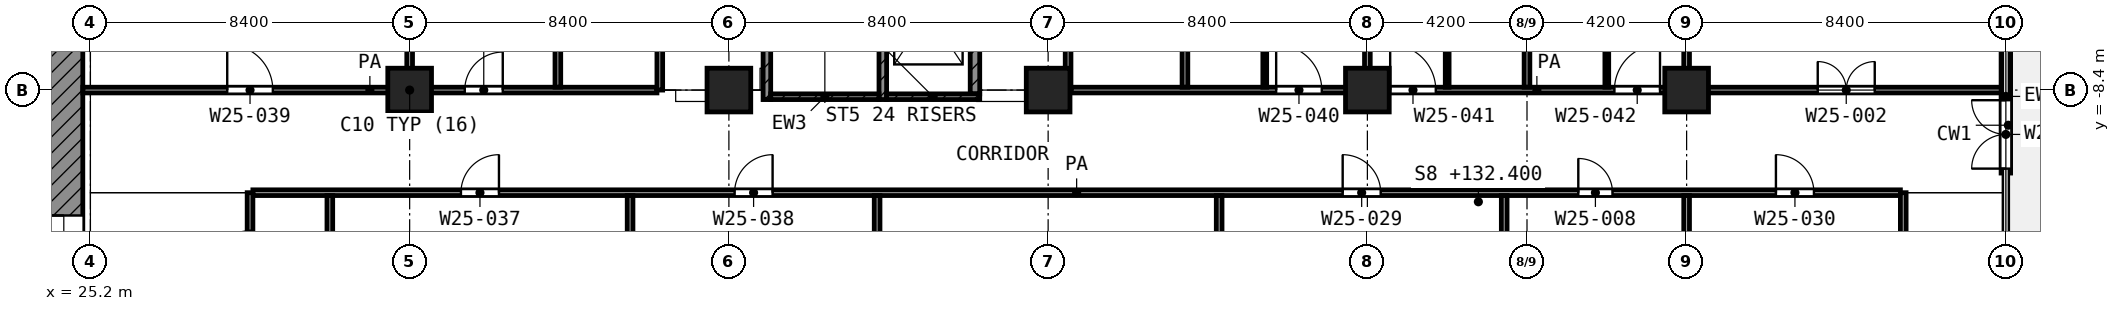
"""IFC4 building model, lengths in metres.
Left out: names, types, materials, properties, quantities, classifications, styles, units other than length and angle.
Written with IfcOpenShell. Run it as: python <this file> out.ifc"""

import sys

from ifc_helpers import new_model, si_unit, direction, frame, frame_2d, origin, origin_2d, place, context, subcontext, project, spatial, rectangle, extrude, element, fill, save


model = new_model("IFC4")
c1 = context("Model", 3, precision=1e-05, world=origin(), true_north=direction((0.0, 1.0)))
c2 = subcontext(c1, "Body", "Model", "MODEL_VIEW")
j1 = project(units=[si_unit("LENGTHUNIT", "METRE"), si_unit("PLANEANGLEUNIT", "RADIAN")], contexts=[c1])
p1 = place(None, origin())
s1 = spatial("IfcSite", under=j1, at=p1, CompositionType="ELEMENT")
p2 = place(p1, origin())
s2 = spatial("IfcBuilding", under=s1, at=p2, CompositionType="ELEMENT")
p3 = place(p2, frame((0.0, 0.0, 132.4)))
s3 = spatial("IfcBuildingStorey", under=s2, at=p3, CompositionType="ELEMENT", Elevation=132.4)
for number, where, z_axis, x_axis in (
    (1, (33.6, -8.4, 0.0), (0.0, 0.0, 1.0), (1.0, 0.0, 0.0)),
    (2, (42.0, -8.4, 0.0), (0.0, 0.0, 1.0), (1.0, 0.0, 0.0)),
    (3, (50.4, -8.4, 0.0), (0.0, 0.0, 1.0), (1.0, 0.0, 0.0)),
    (4, (58.8, -8.4, 0.0), (0.0, 0.0, 1.0), (1.0, 0.0, 0.0)),
    (5, (67.2, -8.4, 0.0), (0.0, 0.0, 1.0), (1.0, 0.0, 0.0)),
):
    element("IfcColumn", number, at=place(p3, frame(where, z_axis=z_axis, x_axis=x_axis)), inside=s3, PredefinedType="COLUMN", context=c2, shape_type="SweptSolid", body=[
        extrude(rectangle(XDim=1.15, YDim=1.15, at=origin_2d()), origin(), (0.0, 0.0, 1.0), 4.2),
    ])
p4 = place(p3, frame((75.6, -10.583, 0.0), z_axis=(0.0, 0.0, 1.0), x_axis=(0.0, 1.0, 0.0)))
e6 = element("IfcWall", 6, at=p4, inside=s3, PredefinedType="SOLIDWALL", context=c2, shape_type="SweptSolid", body=[
    extrude(rectangle(XDim=4.033, YDim=0.25, at=frame_2d((2.017, 0.0))), origin(), (0.0, 0.0, 1.0), 3.48),
])
p5 = place(p4, frame((0.117, 0.0, 0.0)))
e7 = element("IfcOpeningElement", 7, at=p5, cuts=e6, PredefinedType="OPENING", context=c2, shape_type="SweptSolid", body=[
    extrude(rectangle(XDim=1.8, YDim=2.1, at=frame_2d((0.9, 1.05))), frame((0.0, 0.135, 0.0), z_axis=(0.0, -1.0, 0.0), x_axis=(1.0, 0.0, 0.0)), (0.0, 0.0, 1.0), 0.27),
])
p6 = place(p3, frame((24.5, -24.0, 0.0), z_axis=(0.0, 0.0, 1.0), x_axis=(0.0, 1.0, 0.0)))
e8 = element("IfcWall", 8, at=p6, inside=s3, PredefinedType="SHEAR", context=c2, shape_type="SweptSolid", body=[
    extrude(rectangle(XDim=18.6, YDim=1.0, at=frame_2d((9.3, 0.0))), origin(), (0.0, 0.0, 1.0), 3.6),
])
p7 = place(p6, frame((10.5, 0.0, 0.0)))
e9 = element("IfcOpeningElement", 9, at=p7, cuts=e8, PredefinedType="OPENING", context=c2, shape_type="SweptSolid", body=[
    extrude(rectangle(XDim=1.8, YDim=2.1, at=frame_2d((0.9, 1.05))), frame((0.0, 0.51, 0.0), z_axis=(0.0, -1.0, 0.0), x_axis=(1.0, 0.0, 0.0)), (0.0, 0.0, 1.0), 1.02),
])
p8 = place(p3, frame((43.0, -8.65, 0.0), z_axis=(0.0, 0.0, 1.0), x_axis=(0.0, 1.0, 0.0)))
e10 = element("IfcWall", 10, at=p8, inside=s3, PredefinedType="SHEAR", context=c2, shape_type="SweptSolid", body=[
    extrude(rectangle(XDim=8.35, YDim=0.2, at=frame_2d((4.175, 0.0))), origin(), (0.0, 0.0, 1.0), 3.6),
])
p9 = place(p8, frame((7.0, 0.0, 0.0)))
e11 = element("IfcOpeningElement", 11, at=p9, cuts=e10, PredefinedType="OPENING", context=c2, shape_type="SweptSolid", body=[
    extrude(rectangle(XDim=1.1, YDim=2.1, at=frame_2d((0.55, 1.05))), frame((0.0, 0.11, 0.0), z_axis=(0.0, -1.0, 0.0), x_axis=(1.0, 0.0, 0.0)), (0.0, 0.0, 1.0), 0.22),
])
p10 = place(p3, frame((46.05, -8.65, 0.0), z_axis=(0.0, 0.0, 1.0), x_axis=(0.0, 1.0, 0.0)))
e12 = element("IfcWall", 12, at=p10, inside=s3, PredefinedType="SHEAR", context=c2, shape_type="SweptSolid", body=[
    extrude(rectangle(XDim=8.35, YDim=0.2, at=frame_2d((4.175, 0.0))), origin(), (0.0, 0.0, 1.0), 3.6),
])
p11 = place(p10, frame((7.0, 0.0, 0.0)))
e13 = element("IfcOpeningElement", 13, at=p11, cuts=e12, PredefinedType="OPENING", context=c2, shape_type="SweptSolid", body=[
    extrude(rectangle(XDim=1.1, YDim=2.1, at=frame_2d((0.55, 1.05))), frame((0.0, 0.11, 0.0), z_axis=(0.0, -1.0, 0.0), x_axis=(1.0, 0.0, 0.0)), (0.0, 0.0, 1.0), 0.22),
])
p12 = place(p3, frame((43.1, -8.575, 0.0), z_axis=(0.0, 0.0, 1.0), x_axis=(1.0, 0.0, 0.0)))
e14 = element("IfcWall", 14, at=p12, inside=s3, PredefinedType="SHEAR", context=c2, shape_type="SweptSolid", body=[
    extrude(rectangle(XDim=2.85, YDim=0.15, at=frame_2d((1.425, 0.0))), origin(), (0.0, 0.0, 1.0), 3.6),
])
p13 = place(p3, frame((46.15, -8.575, 0.0), z_axis=(0.0, 0.0, 1.0), x_axis=(1.0, 0.0, 0.0)))
e15 = element("IfcWall", 15, at=p13, inside=s3, PredefinedType="SHEAR", context=c2, shape_type="SweptSolid", body=[
    extrude(rectangle(XDim=2.45, YDim=0.15, at=frame_2d((1.225, 0.0))), origin(), (0.0, 0.0, 1.0), 3.6),
])
p14 = place(p3, frame((48.475, -8.5, 0.0), z_axis=(0.0, 0.0, 1.0), x_axis=(0.0, 1.0, 0.0)))
e16 = element("IfcWall", 16, at=p14, inside=s3, PredefinedType="SHEAR", context=c2, shape_type="SweptSolid", body=[
    extrude(rectangle(XDim=3.475, YDim=0.25, at=frame_2d((1.738, 0.0))), origin(), (0.0, 0.0, 1.0), 3.6),
])
for number, where, z_axis, x_axis in (
    (17, (56.1, -8.325, 0.0), (0.0, 0.0, 1.0), (0.0, 1.0, 0.0)),
    (18, (60.9, -8.325, 0.0), (0.0, 0.0, 1.0), (0.0, 1.0, 0.0)),
    (19, (65.1, -8.325, 0.0), (0.0, 0.0, 1.0), (0.0, 1.0, 0.0)),
):
    element("IfcWall", number, at=place(p3, frame(where, z_axis=z_axis, x_axis=x_axis)), inside=s3, PredefinedType="PARTITIONING", context=c2, shape_type="SweptSolid", body=[
        extrude(rectangle(XDim=3.225, YDim=0.1, at=frame_2d((1.612, 0.0))), origin(), (0.0, 0.0, 1.0), 3.6),
    ])
p15 = place(p3, frame((29.475, -11.1, 0.0), z_axis=(0.0, 0.0, 1.0), x_axis=(1.0, 0.0, 0.0)))
e20 = element("IfcWall", 20, at=p15, inside=s3, PredefinedType="PARTITIONING", context=c2, shape_type="SweptSolid", body=[
    extrude(rectangle(XDim=43.35, YDim=0.15, at=frame_2d((21.675, 0.0))), origin(), (0.0, 0.0, 1.0), 3.6),
])
p16 = place(p15, frame((28.675, 0.0, 0.0)))
e21 = element("IfcOpeningElement", 21, at=p16, cuts=e20, PredefinedType="OPENING", context=c2, shape_type="SweptSolid", body=[
    extrude(rectangle(XDim=1.0, YDim=2.1, at=frame_2d((0.5, 1.05))), frame((0.0, 0.085, 0.0), z_axis=(0.0, -1.0, 0.0), x_axis=(1.0, 0.0, 0.0)), (0.0, 0.0, 1.0), 0.17),
])
p17 = place(p15, frame((34.875, 0.0, 0.0)))
e22 = element("IfcOpeningElement", 22, at=p17, cuts=e20, PredefinedType="OPENING", context=c2, shape_type="SweptSolid", body=[
    extrude(rectangle(XDim=0.9, YDim=2.1, at=frame_2d((0.45, 1.05))), frame((0.0, 0.085, 0.0), z_axis=(0.0, -1.0, 0.0), x_axis=(1.0, 0.0, 0.0)), (0.0, 0.0, 1.0), 0.17),
])
p18 = place(p15, frame((40.075, 0.0, 0.0)))
e23 = element("IfcOpeningElement", 23, at=p18, cuts=e20, PredefinedType="OPENING", context=c2, shape_type="SweptSolid", body=[
    extrude(rectangle(XDim=1.0, YDim=2.1, at=frame_2d((0.5, 1.05))), frame((0.0, 0.085, 0.0), z_axis=(0.0, -1.0, 0.0), x_axis=(1.0, 0.0, 0.0)), (0.0, 0.0, 1.0), 0.17),
])
p19 = place(p15, frame((5.475, 0.0, 0.0)))
e24 = element("IfcOpeningElement", 24, at=p19, cuts=e20, PredefinedType="OPENING", context=c2, shape_type="SweptSolid", body=[
    extrude(rectangle(XDim=1.0, YDim=2.1, at=frame_2d((0.5, 1.05))), frame((0.0, 0.085, 0.0), z_axis=(0.0, -1.0, 0.0), x_axis=(1.0, 0.0, 0.0)), (0.0, 0.0, 1.0), 0.17),
])
p20 = place(p15, frame((12.675, 0.0, 0.0)))
e25 = element("IfcOpeningElement", 25, at=p20, cuts=e20, PredefinedType="OPENING", context=c2, shape_type="SweptSolid", body=[
    extrude(rectangle(XDim=1.0, YDim=2.1, at=frame_2d((0.5, 1.05))), frame((0.0, 0.085, 0.0), z_axis=(0.0, -1.0, 0.0), x_axis=(1.0, 0.0, 0.0)), (0.0, 0.0, 1.0), 0.17),
])
p21 = place(p3, frame((25.0, -8.4, 0.0), z_axis=(0.0, 0.0, 1.0), x_axis=(1.0, 0.0, 0.0)))
e26 = element("IfcWall", 26, at=p21, inside=s3, PredefinedType="PARTITIONING", context=c2, shape_type="SweptSolid", body=[
    extrude(rectangle(XDim=15.107, YDim=0.15, at=frame_2d((7.553, 0.0))), origin(), (0.0, 0.0, 1.0), 3.6),
])
p22 = place(p21, frame((3.8, 0.0, 0.0)))
e27 = element("IfcOpeningElement", 27, at=p22, cuts=e26, PredefinedType="OPENING", context=c2, shape_type="SweptSolid", body=[
    extrude(rectangle(XDim=1.2, YDim=2.1, at=frame_2d((0.6, 1.05))), frame((0.0, 0.085, 0.0), z_axis=(0.0, -1.0, 0.0), x_axis=(1.0, 0.0, 0.0)), (0.0, 0.0, 1.0), 0.17),
])
p23 = place(p21, frame((10.05, 0.0, 0.0)))
e28 = element("IfcOpeningElement", 28, at=p23, cuts=e26, PredefinedType="OPENING", context=c2, shape_type="SweptSolid", body=[
    extrude(rectangle(XDim=1.0, YDim=2.1, at=frame_2d((0.5, 1.05))), frame((0.0, 0.085, 0.0), z_axis=(0.0, -1.0, 0.0), x_axis=(1.0, 0.0, 0.0)), (0.0, 0.0, 1.0), 0.17),
])
p24 = place(p3, frame((51.0, -8.4, 0.0), z_axis=(0.0, 0.0, 1.0), x_axis=(1.0, 0.0, 0.0)))
e29 = element("IfcWall", 29, at=p24, inside=s3, PredefinedType="PARTITIONING", context=c2, shape_type="SweptSolid", body=[
    extrude(rectangle(XDim=24.52, YDim=0.15, at=frame_2d((12.26, 0.0))), origin(), (0.0, 0.0, 1.0), 3.6),
])
p25 = place(p24, frame((5.4, 0.0, 0.0)))
e30 = element("IfcOpeningElement", 30, at=p25, cuts=e29, PredefinedType="OPENING", context=c2, shape_type="SweptSolid", body=[
    extrude(rectangle(XDim=1.2, YDim=2.1, at=frame_2d((0.6, 1.05))), frame((0.0, 0.085, 0.0), z_axis=(0.0, -1.0, 0.0), x_axis=(1.0, 0.0, 0.0)), (0.0, 0.0, 1.0), 0.17),
])
p26 = place(p24, frame((8.4, 0.0, 0.0)))
e31 = element("IfcOpeningElement", 31, at=p26, cuts=e29, PredefinedType="OPENING", context=c2, shape_type="SweptSolid", body=[
    extrude(rectangle(XDim=1.2, YDim=2.1, at=frame_2d((0.6, 1.05))), frame((0.0, 0.085, 0.0), z_axis=(0.0, -1.0, 0.0), x_axis=(1.0, 0.0, 0.0)), (0.0, 0.0, 1.0), 0.17),
])
p27 = place(p24, frame((14.3, 0.0, 0.0)))
e32 = element("IfcOpeningElement", 32, at=p27, cuts=e29, PredefinedType="OPENING", context=c2, shape_type="SweptSolid", body=[
    extrude(rectangle(XDim=1.2, YDim=2.1, at=frame_2d((0.6, 1.05))), frame((0.0, 0.085, 0.0), z_axis=(0.0, -1.0, 0.0), x_axis=(1.0, 0.0, 0.0)), (0.0, 0.0, 1.0), 0.17),
])
p28 = place(p24, frame((19.65, 0.0, 0.0)))
e33 = element("IfcOpeningElement", 33, at=p28, cuts=e29, PredefinedType="OPENING", context=c2, shape_type="SweptSolid", body=[
    extrude(rectangle(XDim=1.5, YDim=2.1, at=frame_2d((0.75, 1.05))), frame((0.0, 0.085, 0.0), z_axis=(0.0, -1.0, 0.0), x_axis=(1.0, 0.0, 0.0)), (0.0, 0.0, 1.0), 0.17),
])
p29 = place(p3, frame((29.4, -14.1, 0.0), z_axis=(0.0, 0.0, 1.0), x_axis=(0.0, 1.0, 0.0)))
e34 = element("IfcWall", 34, at=p29, inside=s3, PredefinedType="PARTITIONING", context=c2, shape_type="SweptSolid", body=[
    extrude(rectangle(XDim=3.0, YDim=0.15, at=frame_2d((1.5, 0.0))), origin(), (0.0, 0.0, 1.0), 3.6),
])
p30 = place(p29, frame((1.0, 0.0, 0.0)))
e35 = element("IfcOpeningElement", 35, at=p30, cuts=e34, PredefinedType="OPENING", context=c2, shape_type="SweptSolid", body=[
    extrude(rectangle(XDim=1.0, YDim=2.1, at=frame_2d((0.5, 1.05))), frame((0.0, 0.085, 0.0), z_axis=(0.0, -1.0, 0.0), x_axis=(1.0, 0.0, 0.0)), (0.0, 0.0, 1.0), 0.17),
])
p31 = place(p3, frame((31.5, -14.025, 0.0), z_axis=(0.0, 0.0, 1.0), x_axis=(0.0, 1.0, 0.0)))
e36 = element("IfcWall", 36, at=p31, inside=s3, PredefinedType="PARTITIONING", context=c2, shape_type="SweptSolid", body=[
    extrude(rectangle(XDim=2.85, YDim=0.15, at=frame_2d((1.425, 0.0))), origin(), (0.0, 0.0, 1.0), 3.6),
])
for number, where, z_axis, x_axis in (
    (37, (33.6, -8.325, 0.0), (0.0, 0.0, 1.0), (0.0, 1.0, 0.0)),
    (38, (37.5, -8.325, 0.0), (0.0, 0.0, 1.0), (0.0, 1.0, 0.0)),
):
    element("IfcWall", number, at=place(p3, frame(where, z_axis=z_axis, x_axis=x_axis)), inside=s3, PredefinedType="PARTITIONING", context=c2, shape_type="SweptSolid", body=[
        extrude(rectangle(XDim=8.322, YDim=0.15, at=frame_2d((4.161, 0.0))), origin(), (0.0, 0.0, 1.0), 3.6),
    ])
p32 = place(p3, frame((39.4, -14.025, 0.0), z_axis=(0.0, 0.0, 1.0), x_axis=(0.0, 1.0, 0.0)))
e39 = element("IfcWall", 39, at=p32, inside=s3, PredefinedType="PARTITIONING", context=c2, shape_type="SweptSolid", body=[
    extrude(rectangle(XDim=2.85, YDim=0.15, at=frame_2d((1.425, 0.0))), origin(), (0.0, 0.0, 1.0), 3.6),
])
p33 = place(p3, frame((40.182, -8.4, 0.0), z_axis=(0.0, 0.0, 1.0), x_axis=(0.0, 1.0, 0.0)))
e40 = element("IfcWall", 40, at=p33, inside=s3, PredefinedType="PARTITIONING", context=c2, shape_type="SweptSolid", body=[
    extrude(rectangle(XDim=8.05, YDim=0.15, at=frame_2d((4.025, 0.0))), origin(), (0.0, 0.0, 1.0), 3.6),
])
p34 = place(p33, frame((3.525, 0.0, 0.0)))
e41 = element("IfcOpeningElement", 41, at=p34, cuts=e40, PredefinedType="OPENING", context=c2, shape_type="SweptSolid", body=[
    extrude(rectangle(XDim=1.0, YDim=2.1, at=frame_2d((0.5, 1.05))), frame((0.0, 0.085, 0.0), z_axis=(0.0, -1.0, 0.0), x_axis=(1.0, 0.0, 0.0)), (0.0, 0.0, 1.0), 0.17),
])
p35 = place(p3, frame((45.9, -14.025, 0.0), z_axis=(0.0, 0.0, 1.0), x_axis=(0.0, 1.0, 0.0)))
e42 = element("IfcWall", 42, at=p35, inside=s3, PredefinedType="PARTITIONING", context=c2, shape_type="SweptSolid", body=[
    extrude(rectangle(XDim=2.85, YDim=0.15, at=frame_2d((1.425, 0.0))), origin(), (0.0, 0.0, 1.0), 3.6),
])
p36 = place(p3, frame((50.925, -8.4, 0.0), z_axis=(0.0, 0.0, 1.0), x_axis=(0.0, 1.0, 0.0)))
e43 = element("IfcWall", 43, at=p36, inside=s3, PredefinedType="PARTITIONING", context=c2, shape_type="SweptSolid", body=[
    extrude(rectangle(XDim=6.548, YDim=0.15, at=frame_2d((3.274, 0.0))), origin(), (0.0, 0.0, 1.0), 3.6),
])
p37 = place(p36, frame((2.774, 0.0, 0.0)))
e44 = element("IfcOpeningElement", 44, at=p37, cuts=e43, PredefinedType="OPENING", context=c2, shape_type="SweptSolid", body=[
    extrude(rectangle(XDim=1.0, YDim=2.1, at=frame_2d((0.5, 1.05))), frame((0.0, 0.085, 0.0), z_axis=(0.0, -1.0, 0.0), x_axis=(1.0, 0.0, 0.0)), (0.0, 0.0, 1.0), 0.17),
])
p38 = place(p3, frame((54.0, -8.325, 0.0), z_axis=(0.0, 0.0, 1.0), x_axis=(0.0, 1.0, 0.0)))
e45 = element("IfcWall", 45, at=p38, inside=s3, PredefinedType="PARTITIONING", context=c2, shape_type="SweptSolid", body=[
    extrude(rectangle(XDim=8.322, YDim=0.15, at=frame_2d((4.161, 0.0))), origin(), (0.0, 0.0, 1.0), 3.6),
])
p39 = place(p3, frame((54.9, -14.025, 0.0), z_axis=(0.0, 0.0, 1.0), x_axis=(0.0, 1.0, 0.0)))
e46 = element("IfcWall", 46, at=p39, inside=s3, PredefinedType="PARTITIONING", context=c2, shape_type="SweptSolid", body=[
    extrude(rectangle(XDim=2.85, YDim=0.15, at=frame_2d((1.425, 0.0))), origin(), (0.0, 0.0, 1.0), 3.6),
])
p40 = place(p3, frame((58.8, -8.325, 0.0), z_axis=(0.0, 0.0, 1.0), x_axis=(0.0, 1.0, 0.0)))
e47 = element("IfcWall", 47, at=p40, inside=s3, PredefinedType="PARTITIONING", context=c2, shape_type="SweptSolid", body=[
    extrude(rectangle(XDim=8.25, YDim=0.15, at=frame_2d((4.125, 0.0))), origin(), (0.0, 0.0, 1.0), 3.6),
])
p41 = place(p3, frame((62.4, -14.025, 0.0), z_axis=(0.0, 0.0, 1.0), x_axis=(0.0, 1.0, 0.0)))
e48 = element("IfcWall", 48, at=p41, inside=s3, PredefinedType="PARTITIONING", context=c2, shape_type="SweptSolid", body=[
    extrude(rectangle(XDim=2.85, YDim=0.15, at=frame_2d((1.425, 0.0))), origin(), (0.0, 0.0, 1.0), 3.6),
])
p42 = place(p3, frame((63.0, -8.325, 0.0), z_axis=(0.0, 0.0, 1.0), x_axis=(0.0, 1.0, 0.0)))
e49 = element("IfcWall", 49, at=p42, inside=s3, PredefinedType="PARTITIONING", context=c2, shape_type="SweptSolid", body=[
    extrude(rectangle(XDim=8.325, YDim=0.15, at=frame_2d((4.163, 0.0))), origin(), (0.0, 0.0, 1.0), 3.6),
])
p43 = place(p3, frame((67.2, -14.025, 0.0), z_axis=(0.0, 0.0, 1.0), x_axis=(0.0, 1.0, 0.0)))
e50 = element("IfcWall", 50, at=p43, inside=s3, PredefinedType="PARTITIONING", context=c2, shape_type="SweptSolid", body=[
    extrude(rectangle(XDim=2.85, YDim=0.15, at=frame_2d((1.425, 0.0))), origin(), (0.0, 0.0, 1.0), 3.6),
])
p44 = place(p3, frame((67.2, -8.325, 0.0), z_axis=(0.0, 0.0, 1.0), x_axis=(0.0, 1.0, 0.0)))
e51 = element("IfcWall", 51, at=p44, inside=s3, PredefinedType="PARTITIONING", context=c2, shape_type="SweptSolid", body=[
    extrude(rectangle(XDim=8.323, YDim=0.15, at=frame_2d((4.162, 0.0))), origin(), (0.0, 0.0, 1.0), 3.6),
])
p45 = place(p3, frame((72.9, -14.1, 0.0), z_axis=(0.0, 0.0, 1.0), x_axis=(0.0, 1.0, 0.0)))
e52 = element("IfcWall", 52, at=p45, inside=s3, PredefinedType="PARTITIONING", context=c2, shape_type="SweptSolid", body=[
    extrude(rectangle(XDim=3.0, YDim=0.15, at=frame_2d((1.5, 0.0))), origin(), (0.0, 0.0, 1.0), 3.6),
])
p46 = place(p5, origin())
e53 = element("IfcDoor", 53, at=p46, inside=s3, OperationType="DOUBLE_DOOR_SINGLE_SWING", PredefinedType="DOOR", context=c2, shape_type="SweptSolid", body=[
    extrude(rectangle(XDim=1.8, YDim=2.1, at=frame_2d((0.9, 1.05))), frame((0.0, 0.025, 0.0), z_axis=(0.0, -1.0, 0.0), x_axis=(1.0, 0.0, 0.0)), (0.0, 0.0, 1.0), 0.05),
])
fill(e7, e53)
p47 = place(p7, origin())
e54 = element("IfcDoor", 54, at=p47, inside=s3, OperationType="DOUBLE_DOOR_SINGLE_SWING", PredefinedType="DOOR", context=c2, shape_type="SweptSolid", body=[
    extrude(rectangle(XDim=1.8, YDim=2.1, at=frame_2d((0.9, 1.05))), frame((0.0, 0.025, 0.0), z_axis=(0.0, -1.0, 0.0), x_axis=(1.0, 0.0, 0.0)), (0.0, 0.0, 1.0), 0.05),
])
fill(e9, e54)
p48 = place(p22, origin())
e55 = element("IfcDoor", 55, at=p48, inside=s3, OperationType="SINGLE_SWING_LEFT", PredefinedType="DOOR", context=c2, shape_type="SweptSolid", body=[
    extrude(rectangle(XDim=1.2, YDim=2.1, at=frame_2d((0.6, 1.05))), frame((0.0, 0.025, 0.0), z_axis=(0.0, -1.0, 0.0), x_axis=(1.0, 0.0, 0.0)), (0.0, 0.0, 1.0), 0.05),
])
fill(e27, e55)
p49 = place(p23, origin())
e56 = element("IfcDoor", 56, at=p49, inside=s3, OperationType="SINGLE_SWING_RIGHT", PredefinedType="DOOR", context=c2, shape_type="SweptSolid", body=[
    extrude(rectangle(XDim=1.0, YDim=2.1, at=frame_2d((0.5, 1.05))), frame((0.0, 0.025, 0.0), z_axis=(0.0, -1.0, 0.0), x_axis=(1.0, 0.0, 0.0)), (0.0, 0.0, 1.0), 0.05),
])
fill(e28, e56)
p50 = place(p25, origin())
e57 = element("IfcDoor", 57, at=p50, inside=s3, OperationType="SINGLE_SWING_LEFT", PredefinedType="DOOR", context=c2, shape_type="SweptSolid", body=[
    extrude(rectangle(XDim=1.2, YDim=2.1, at=frame_2d((0.6, 1.05))), frame((0.0, 0.025, 0.0), z_axis=(0.0, -1.0, 0.0), x_axis=(1.0, 0.0, 0.0)), (0.0, 0.0, 1.0), 0.05),
])
fill(e30, e57)
p51 = place(p26, origin())
e58 = element("IfcDoor", 58, at=p51, inside=s3, OperationType="SINGLE_SWING_LEFT", PredefinedType="DOOR", context=c2, shape_type="SweptSolid", body=[
    extrude(rectangle(XDim=1.2, YDim=2.1, at=frame_2d((0.6, 1.05))), frame((0.0, 0.025, 0.0), z_axis=(0.0, -1.0, 0.0), x_axis=(1.0, 0.0, 0.0)), (0.0, 0.0, 1.0), 0.05),
])
fill(e31, e58)
p52 = place(p27, origin())
e59 = element("IfcDoor", 59, at=p52, inside=s3, OperationType="SINGLE_SWING_RIGHT", PredefinedType="DOOR", context=c2, shape_type="SweptSolid", body=[
    extrude(rectangle(XDim=1.2, YDim=2.1, at=frame_2d((0.6, 1.05))), frame((0.0, 0.025, 0.0), z_axis=(0.0, -1.0, 0.0), x_axis=(1.0, 0.0, 0.0)), (0.0, 0.0, 1.0), 0.05),
])
fill(e32, e59)
p53 = place(p28, origin())
e60 = element("IfcDoor", 60, at=p53, inside=s3, OperationType="DOUBLE_DOOR_SINGLE_SWING", PredefinedType="DOOR", context=c2, shape_type="SweptSolid", body=[
    extrude(rectangle(XDim=1.5, YDim=2.1, at=frame_2d((0.75, 1.05))), frame((0.0, 0.025, 0.0), z_axis=(0.0, -1.0, 0.0), x_axis=(1.0, 0.0, 0.0)), (0.0, 0.0, 1.0), 0.05),
])
fill(e33, e60)
p54 = place(p16, origin())
e61 = element("IfcDoor", 61, at=p54, inside=s3, OperationType="SINGLE_SWING_LEFT", PredefinedType="DOOR", context=c2, shape_type="SweptSolid", body=[
    extrude(rectangle(XDim=1.0, YDim=2.1, at=frame_2d((0.5, 1.05))), frame((0.0, 0.025, 0.0), z_axis=(0.0, -1.0, 0.0), x_axis=(1.0, 0.0, 0.0)), (0.0, 0.0, 1.0), 0.05),
])
fill(e21, e61)
p55 = place(p17, origin())
e62 = element("IfcDoor", 62, at=p55, inside=s3, OperationType="SINGLE_SWING_LEFT", PredefinedType="DOOR", context=c2, shape_type="SweptSolid", body=[
    extrude(rectangle(XDim=0.9, YDim=2.1, at=frame_2d((0.45, 1.05))), frame((0.0, 0.025, 0.0), z_axis=(0.0, -1.0, 0.0), x_axis=(1.0, 0.0, 0.0)), (0.0, 0.0, 1.0), 0.05),
])
fill(e22, e62)
p56 = place(p18, origin())
e63 = element("IfcDoor", 63, at=p56, inside=s3, OperationType="SINGLE_SWING_LEFT", PredefinedType="DOOR", context=c2, shape_type="SweptSolid", body=[
    extrude(rectangle(XDim=1.0, YDim=2.1, at=frame_2d((0.5, 1.05))), frame((0.0, 0.025, 0.0), z_axis=(0.0, -1.0, 0.0), x_axis=(1.0, 0.0, 0.0)), (0.0, 0.0, 1.0), 0.05),
])
fill(e23, e63)
p57 = place(p19, origin())
e64 = element("IfcDoor", 64, at=p57, inside=s3, OperationType="SINGLE_SWING_RIGHT", PredefinedType="DOOR", context=c2, shape_type="SweptSolid", body=[
    extrude(rectangle(XDim=1.0, YDim=2.1, at=frame_2d((0.5, 1.05))), frame((0.0, 0.025, 0.0), z_axis=(0.0, -1.0, 0.0), x_axis=(1.0, 0.0, 0.0)), (0.0, 0.0, 1.0), 0.05),
])
fill(e24, e64)
p58 = place(p20, origin())
e65 = element("IfcDoor", 65, at=p58, inside=s3, OperationType="SINGLE_SWING_RIGHT", PredefinedType="DOOR", context=c2, shape_type="SweptSolid", body=[
    extrude(rectangle(XDim=1.0, YDim=2.1, at=frame_2d((0.5, 1.05))), frame((0.0, 0.025, 0.0), z_axis=(0.0, -1.0, 0.0), x_axis=(1.0, 0.0, 0.0)), (0.0, 0.0, 1.0), 0.05),
])
fill(e25, e65)
save(model, sys.argv[1])
